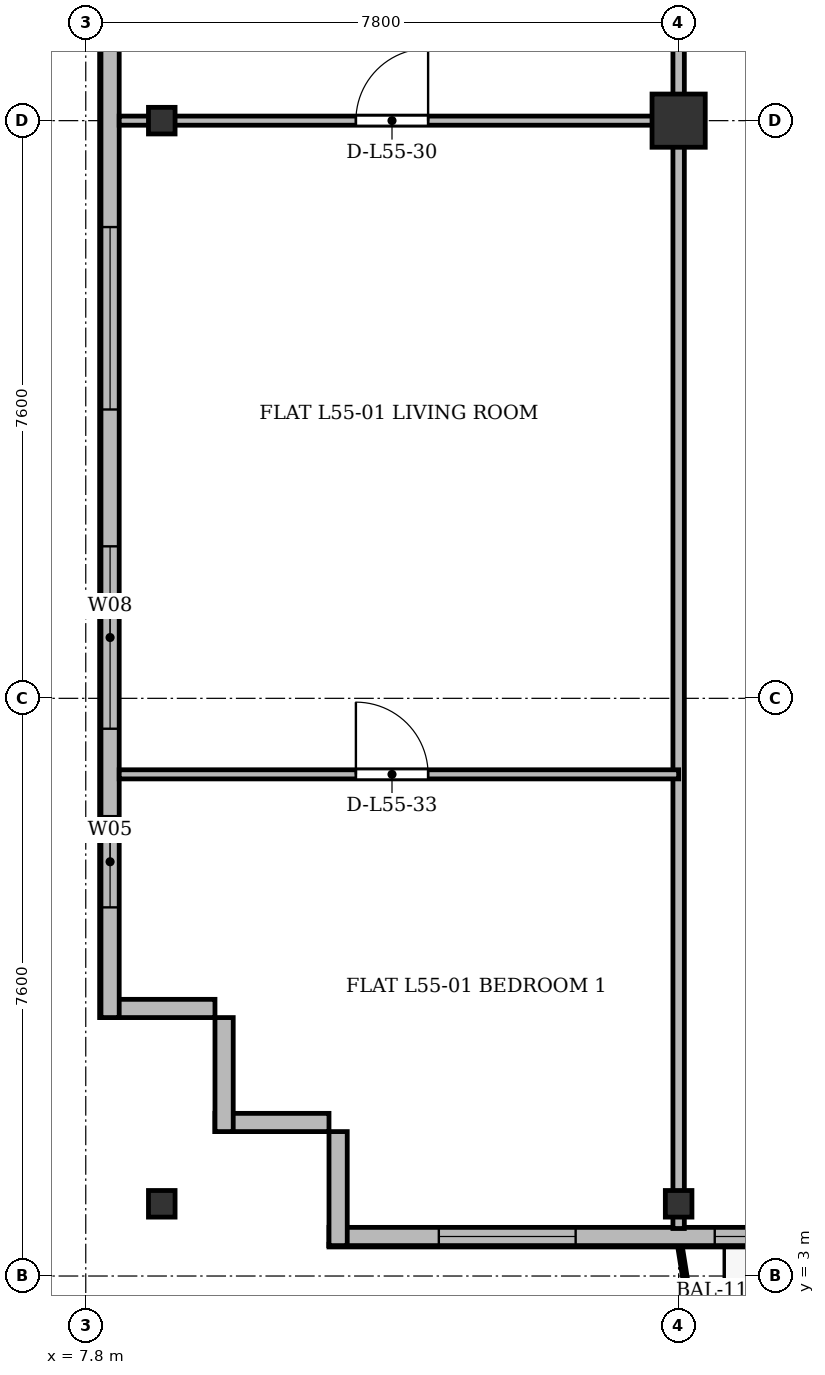
"""IFC4 building model, lengths in metres.
Left out: names, types, materials, properties, quantities, classifications, styles, units other than length and angle.
Written with IfcOpenShell. Run it as: python <this file> out.ifc"""

import sys

from ifc_helpers import new_model, si_unit, direction, frame, frame_2d, origin, origin_2d, place, context, subcontext, project, spatial, rectangle, i_section, extrude, source, transform, mapped, element, fill, save


model = new_model("IFC4")
c1 = context("Model", 3, precision=1e-05, world=origin(), true_north=direction((0.0, 1.0)))
c2 = subcontext(c1, "Body", "Model", "MODEL_VIEW")
j1 = project(units=[si_unit("LENGTHUNIT", "METRE"), si_unit("PLANEANGLEUNIT", "RADIAN")], contexts=[c1])
p1 = place(None, origin())
s1 = spatial("IfcSite", under=j1, at=p1, CompositionType="ELEMENT")
p2 = place(p1, origin())
s2 = spatial("IfcBuilding", under=s1, at=p2, CompositionType="ELEMENT")
p3 = place(p2, frame((0.0, 0.0, 212.1)))
s3 = spatial("IfcBuildingStorey", under=s2, at=p3, CompositionType="ELEMENT", Elevation=212.1)
m1 = source(origin(), c2, "Body", "SweptSolid", [
    extrude(i_section(OverallWidth=0.35, OverallDepth=0.35, WebThickness=0.018, FlangeThickness=0.028, at=origin_2d()), origin(), (0.0, 0.0, 1.0), 3.6),
])
for number, where, z_axis, x_axis in (
    (1, (8.8, 3.95, 0.0), (0.0, 0.0, 1.0), (1.0, 0.0, 0.0)),
    (2, (8.8, 18.2, 0.0), (0.0, 0.0, 1.0), (1.0, 0.0, 0.0)),
    (3, (15.6, 3.95, 0.0), (0.0, 0.0, 1.0), (1.0, 0.0, 0.0)),
):
    element("IfcColumn", number, at=place(p3, frame(where, z_axis=z_axis, x_axis=x_axis)), inside=s3, PredefinedType="COLUMN", context=c2, shape_type="MappedRepresentation", body=[
        mapped(m1, transform((0.0, 0.0, 0.0), x_axis=(1.0, 0.0, 0.0), y_axis=(0.0, 1.0, 0.0), z_axis=(0.0, 0.0, 1.0), scale=1.0)),
    ])
m2 = source(origin(), c2, "Body", "SweptSolid", [
    extrude(rectangle(XDim=0.7, YDim=0.7, at=origin_2d()), origin(), (0.0, 0.0, 1.0), 3.6),
])
p4 = place(p3, frame((15.6, 18.2, 0.0), z_axis=(0.0, 0.0, 1.0), x_axis=(1.0, 0.0, 0.0)))
e4 = element("IfcColumn", 4, at=p4, inside=s3, PredefinedType="COLUMN", context=c2, shape_type="MappedRepresentation", body=[
    mapped(m2, transform((0.0, 0.0, 0.0), x_axis=(1.0, 0.0, 0.0), y_axis=(0.0, 1.0, 0.0), z_axis=(0.0, 0.0, 1.0), scale=1.0)),
])
for number, where, z_axis, x_axis in (
    (5, (11.0, 5.02, 0.0), (0.0, 0.0, 1.0), (-1.0, 0.0, 0.0)),
    (6, (9.62, 4.9, 0.0), (0.0, 0.0, 1.0), (0.0, 1.0, 0.0)),
):
    element("IfcWall", number, at=place(p3, frame(where, z_axis=z_axis, x_axis=x_axis)), inside=s3, PredefinedType="SOLIDWALL", context=c2, shape_type="SweptSolid", body=[
        extrude(rectangle(XDim=1.5, YDim=0.24, at=frame_2d((0.75, 0.0))), origin(), (0.0, 0.0, 1.0), 3.36),
    ])
p5 = place(p3, frame((9.5, 6.52, 0.0), z_axis=(0.0, 0.0, 1.0), x_axis=(-1.0, 0.0, 0.0)))
e7 = element("IfcWall", 7, at=p5, inside=s3, PredefinedType="SOLIDWALL", context=c2, shape_type="SweptSolid", body=[
    extrude(rectangle(XDim=1.5, YDim=0.24, at=frame_2d((0.75, 0.0))), origin(), (0.0, 0.0, 1.0), 2.86),
])
p6 = place(p3, frame((8.12, 6.4, 0.0), z_axis=(0.0, 0.0, 1.0), x_axis=(0.0, 1.0, 0.0)))
e8 = element("IfcWall", 8, at=p6, inside=s3, PredefinedType="SOLIDWALL", context=c2, shape_type="SweptSolid", body=[
    extrude(rectangle(XDim=39.1, YDim=0.24, at=frame_2d((19.55, 0.0))), origin(), (0.0, 0.0, 1.0), 3.36),
])
p7 = place(p6, frame((1.45, 0.0, 0.92)))
e9 = element("IfcOpeningElement", 9, at=p7, cuts=e8, PredefinedType="OPENING", context=c2, shape_type="SweptSolid", body=[
    extrude(rectangle(XDim=1.2, YDim=1.65, at=frame_2d((0.6, 0.825))), frame((0.0, 0.13, 0.0), z_axis=(0.0, -1.0, 0.0), x_axis=(1.0, 0.0, 0.0)), (0.0, 0.0, 1.0), 0.26),
])
p8 = place(p6, frame((3.8, 0.0, 0.92)))
e10 = element("IfcOpeningElement", 10, at=p8, cuts=e8, PredefinedType="OPENING", context=c2, shape_type="SweptSolid", body=[
    extrude(rectangle(XDim=2.4, YDim=2.1, at=frame_2d((1.2, 1.05))), frame((0.0, 0.13, 0.0), z_axis=(0.0, -1.0, 0.0), x_axis=(1.0, 0.0, 0.0)), (0.0, 0.0, 1.0), 0.26),
])
p9 = place(p6, frame((8.0, 0.0, 0.92)))
e11 = element("IfcOpeningElement", 11, at=p9, cuts=e8, PredefinedType="OPENING", context=c2, shape_type="SweptSolid", body=[
    extrude(rectangle(XDim=2.4, YDim=2.1, at=frame_2d((1.2, 1.05))), frame((0.0, 0.13, 0.0), z_axis=(0.0, -1.0, 0.0), x_axis=(1.0, 0.0, 0.0)), (0.0, 0.0, 1.0), 0.26),
])
p10 = place(p6, frame((15.2, 0.0, 0.92)))
e12 = element("IfcOpeningElement", 12, at=p10, cuts=e8, PredefinedType="OPENING", context=c2, shape_type="SweptSolid", body=[
    extrude(rectangle(XDim=2.4, YDim=2.1, at=frame_2d((1.2, 1.05))), frame((0.0, 0.13, 0.0), z_axis=(0.0, -1.0, 0.0), x_axis=(1.0, 0.0, 0.0)), (0.0, 0.0, 1.0), 0.26),
])
p11 = place(p6, frame((33.4, 0.0, 0.92)))
e13 = element("IfcOpeningElement", 13, at=p11, cuts=e8, PredefinedType="OPENING", context=c2, shape_type="SweptSolid", body=[
    extrude(rectangle(XDim=1.2, YDim=1.65, at=frame_2d((0.6, 0.825))), frame((0.0, 0.13, 0.0), z_axis=(0.0, -1.0, 0.0), x_axis=(1.0, 0.0, 0.0)), (0.0, 0.0, 1.0), 0.26),
])
p12 = place(p6, frame((36.75, 0.0, 0.92)))
e14 = element("IfcOpeningElement", 14, at=p12, cuts=e8, PredefinedType="OPENING", context=c2, shape_type="SweptSolid", body=[
    extrude(rectangle(XDim=1.2, YDim=1.65, at=frame_2d((0.6, 0.825))), frame((0.0, 0.13, 0.0), z_axis=(0.0, -1.0, 0.0), x_axis=(1.0, 0.0, 0.0)), (0.0, 0.0, 1.0), 0.26),
])
p13 = place(p3, frame((63.4, 3.52, 0.0), z_axis=(0.0, 0.0, 1.0), x_axis=(-1.0, 0.0, 0.0)))
e15 = element("IfcWall", 15, at=p13, inside=s3, PredefinedType="SOLIDWALL", context=c2, shape_type="SweptSolid", body=[
    extrude(rectangle(XDim=52.4, YDim=0.24, at=frame_2d((26.2, 0.0))), origin(), (0.0, 0.0, 1.0), 3.36),
])
p14 = place(p13, frame((1.445, 0.0, 0.9)))
e16 = element("IfcOpeningElement", 16, at=p14, cuts=e15, PredefinedType="OPENING", context=c2, shape_type="SweptSolid", body=[
    extrude(rectangle(XDim=1.8, YDim=1.8, at=frame_2d((0.9, 0.9))), frame((0.0, 0.13, 0.0), z_axis=(0.0, -1.0, 0.0), x_axis=(1.0, 0.0, 0.0)), (0.0, 0.0, 1.0), 0.26),
])
p15 = place(p13, frame((5.15, 0.0, 0.9)))
e17 = element("IfcOpeningElement", 17, at=p15, cuts=e15, PredefinedType="OPENING", context=c2, shape_type="SweptSolid", body=[
    extrude(rectangle(XDim=1.5, YDim=1.75, at=frame_2d((0.75, 0.875))), frame((0.0, 0.13, 0.0), z_axis=(0.0, -1.0, 0.0), x_axis=(1.0, 0.0, 0.0)), (0.0, 0.0, 1.0), 0.26),
])
p16 = place(p13, frame((7.45, 0.0, 0.9)))
e18 = element("IfcOpeningElement", 18, at=p16, cuts=e15, PredefinedType="OPENING", context=c2, shape_type="SweptSolid", body=[
    extrude(rectangle(XDim=1.5, YDim=1.75, at=frame_2d((0.75, 0.875))), frame((0.0, 0.13, 0.0), z_axis=(0.0, -1.0, 0.0), x_axis=(1.0, 0.0, 0.0)), (0.0, 0.0, 1.0), 0.26),
])
p17 = place(p13, frame((9.8, 0.0, 0.9)))
e19 = element("IfcOpeningElement", 19, at=p17, cuts=e15, PredefinedType="OPENING", context=c2, shape_type="SweptSolid", body=[
    extrude(rectangle(XDim=2.0, YDim=1.95, at=frame_2d((1.0, 0.975))), frame((0.0, 0.13, 0.0), z_axis=(0.0, -1.0, 0.0), x_axis=(1.0, 0.0, 0.0)), (0.0, 0.0, 1.0), 0.26),
])
p18 = place(p13, frame((14.217, 0.0, 0.0)))
e20 = element("IfcOpeningElement", 20, at=p18, cuts=e15, PredefinedType="OPENING", context=c2, shape_type="SweptSolid", body=[
    extrude(rectangle(XDim=1.2, YDim=2.2, at=frame_2d((0.6, 1.1))), frame((0.0, 0.13, 0.0), z_axis=(0.0, -1.0, 0.0), x_axis=(1.0, 0.0, 0.0)), (0.0, 0.0, 1.0), 0.26),
])
p19 = place(p13, frame((20.034, 0.0, 0.9)))
e21 = element("IfcOpeningElement", 21, at=p19, cuts=e15, PredefinedType="OPENING", context=c2, shape_type="SweptSolid", body=[
    extrude(rectangle(XDim=1.8, YDim=1.8, at=frame_2d((0.9, 0.9))), frame((0.0, 0.13, 0.0), z_axis=(0.0, -1.0, 0.0), x_axis=(1.0, 0.0, 0.0)), (0.0, 0.0, 1.0), 0.26),
])
p20 = place(p13, frame((22.5, 0.0, 0.9)))
e22 = element("IfcOpeningElement", 22, at=p20, cuts=e15, PredefinedType="OPENING", context=c2, shape_type="SweptSolid", body=[
    extrude(rectangle(XDim=2.2, YDim=1.8, at=frame_2d((1.1, 0.9))), frame((0.0, 0.13, 0.0), z_axis=(0.0, -1.0, 0.0), x_axis=(1.0, 0.0, 0.0)), (0.0, 0.0, 1.0), 0.26),
])
p21 = place(p13, frame((25.517, 0.0, 0.9)))
e23 = element("IfcOpeningElement", 23, at=p21, cuts=e15, PredefinedType="OPENING", context=c2, shape_type="SweptSolid", body=[
    extrude(rectangle(XDim=1.5, YDim=1.75, at=frame_2d((0.75, 0.875))), frame((0.0, 0.13, 0.0), z_axis=(0.0, -1.0, 0.0), x_axis=(1.0, 0.0, 0.0)), (0.0, 0.0, 1.0), 0.26),
])
p22 = place(p13, frame((29.2, 0.0, 0.9)))
e24 = element("IfcOpeningElement", 24, at=p22, cuts=e15, PredefinedType="OPENING", context=c2, shape_type="SweptSolid", body=[
    extrude(rectangle(XDim=2.0, YDim=1.95, at=frame_2d((1.0, 0.975))), frame((0.0, 0.13, 0.0), z_axis=(0.0, -1.0, 0.0), x_axis=(1.0, 0.0, 0.0)), (0.0, 0.0, 1.0), 0.26),
])
p23 = place(p13, frame((33.175, 0.0, 0.9)))
e25 = element("IfcOpeningElement", 25, at=p23, cuts=e15, PredefinedType="OPENING", context=c2, shape_type="SweptSolid", body=[
    extrude(rectangle(XDim=1.65, YDim=1.85, at=frame_2d((0.825, 0.925))), frame((0.0, 0.13, 0.0), z_axis=(0.0, -1.0, 0.0), x_axis=(1.0, 0.0, 0.0)), (0.0, 0.0, 1.0), 0.26),
])
p24 = place(p13, frame((35.5, 0.0, 0.9)))
e26 = element("IfcOpeningElement", 26, at=p24, cuts=e15, PredefinedType="OPENING", context=c2, shape_type="SweptSolid", body=[
    extrude(rectangle(XDim=1.8, YDim=1.8, at=frame_2d((0.9, 0.9))), frame((0.0, 0.13, 0.0), z_axis=(0.0, -1.0, 0.0), x_axis=(1.0, 0.0, 0.0)), (0.0, 0.0, 1.0), 0.26),
])
p25 = place(p13, frame((38.05, 0.0, 0.9)))
e27 = element("IfcOpeningElement", 27, at=p25, cuts=e15, PredefinedType="OPENING", context=c2, shape_type="SweptSolid", body=[
    extrude(rectangle(XDim=1.5, YDim=1.75, at=frame_2d((0.75, 0.875))), frame((0.0, 0.13, 0.0), z_axis=(0.0, -1.0, 0.0), x_axis=(1.0, 0.0, 0.0)), (0.0, 0.0, 1.0), 0.26),
])
p26 = place(p13, frame((41.456, 0.0, 0.0)))
e28 = element("IfcOpeningElement", 28, at=p26, cuts=e15, PredefinedType="OPENING", context=c2, shape_type="SweptSolid", body=[
    extrude(rectangle(XDim=1.2, YDim=2.2, at=frame_2d((0.6, 1.1))), frame((0.0, 0.13, 0.0), z_axis=(0.0, -1.0, 0.0), x_axis=(1.0, 0.0, 0.0)), (0.0, 0.0, 1.0), 0.26),
])
p27 = place(p13, frame((43.45, 0.0, 0.9)))
e29 = element("IfcOpeningElement", 29, at=p27, cuts=e15, PredefinedType="OPENING", context=c2, shape_type="SweptSolid", body=[
    extrude(rectangle(XDim=1.5, YDim=1.75, at=frame_2d((0.75, 0.875))), frame((0.0, 0.13, 0.0), z_axis=(0.0, -1.0, 0.0), x_axis=(1.0, 0.0, 0.0)), (0.0, 0.0, 1.0), 0.26),
])
p28 = place(p13, frame((45.675, 0.0, 0.9)))
e30 = element("IfcOpeningElement", 30, at=p28, cuts=e15, PredefinedType="OPENING", context=c2, shape_type="SweptSolid", body=[
    extrude(rectangle(XDim=1.65, YDim=1.85, at=frame_2d((0.825, 0.925))), frame((0.0, 0.13, 0.0), z_axis=(0.0, -1.0, 0.0), x_axis=(1.0, 0.0, 0.0)), (0.0, 0.0, 1.0), 0.26),
])
p29 = place(p13, frame((49.155, 0.0, 0.9)))
e31 = element("IfcOpeningElement", 31, at=p29, cuts=e15, PredefinedType="OPENING", context=c2, shape_type="SweptSolid", body=[
    extrude(rectangle(XDim=1.8, YDim=1.8, at=frame_2d((0.9, 0.9))), frame((0.0, 0.13, 0.0), z_axis=(0.0, -1.0, 0.0), x_axis=(1.0, 0.0, 0.0)), (0.0, 0.0, 1.0), 0.26),
])
p30 = place(p3, frame((11.12, 3.4, 0.0), z_axis=(0.0, 0.0, 1.0), x_axis=(0.0, 1.0, 0.0)))
e32 = element("IfcWall", 32, at=p30, inside=s3, PredefinedType="SOLIDWALL", context=c2, shape_type="SweptSolid", body=[
    extrude(rectangle(XDim=1.5, YDim=0.24, at=frame_2d((0.75, 0.0))), origin(), (0.0, 0.0, 1.0), 2.91),
])
p31 = place(p3, frame((15.6, 3.625, 0.0), z_axis=(0.0, 0.0, 1.0), x_axis=(0.0, 1.0, 0.0)))
e33 = element("IfcWall", 33, at=p31, inside=s3, PredefinedType="PARTITIONING", context=c2, shape_type="SweptSolid", body=[
    extrude(rectangle(XDim=27.175, YDim=0.15, at=frame_2d((13.587, 0.0))), origin(), (0.0, 0.0, 1.0), 2.86),
])
p32 = place(p3, frame((8.24, 18.2, 0.0), z_axis=(0.0, 0.0, 1.0), x_axis=(1.0, 0.0, 0.0)))
e34 = element("IfcWall", 34, at=p32, inside=s3, PredefinedType="PARTITIONING", context=c2, shape_type="SweptSolid", body=[
    extrude(rectangle(XDim=7.36, YDim=0.12, at=frame_2d((3.68, 0.0))), origin(), (0.0, 0.0, 1.0), 2.91),
])
p33 = place(p32, frame((3.114, 0.0, 0.0)))
e35 = element("IfcOpeningElement", 35, at=p33, cuts=e34, PredefinedType="OPENING", context=c2, shape_type="SweptSolid", body=[
    extrude(rectangle(XDim=0.95, YDim=2.15, at=frame_2d((0.475, 1.075))), frame((0.0, 0.07, 0.0), z_axis=(0.0, -1.0, 0.0), x_axis=(1.0, 0.0, 0.0)), (0.0, 0.0, 1.0), 0.14),
])
p34 = place(p3, frame((8.24, 9.6, 0.0), z_axis=(0.0, 0.0, 1.0), x_axis=(1.0, 0.0, 0.0)))
e36 = element("IfcWall", 36, at=p34, inside=s3, PredefinedType="PARTITIONING", context=c2, shape_type="SweptSolid", body=[
    extrude(rectangle(XDim=7.36, YDim=0.12, at=frame_2d((3.68, 0.0))), origin(), (0.0, 0.0, 1.0), 2.86),
])
p35 = place(p34, frame((3.114, 0.0, 0.0)))
e37 = element("IfcOpeningElement", 37, at=p35, cuts=e36, PredefinedType="OPENING", context=c2, shape_type="SweptSolid", body=[
    extrude(rectangle(XDim=0.95, YDim=2.15, at=frame_2d((0.475, 1.075))), frame((0.0, 0.07, 0.0), z_axis=(0.0, -1.0, 0.0), x_axis=(1.0, 0.0, 0.0)), (0.0, 0.0, 1.0), 0.14),
])
m3 = source(origin(), c2, "Body", "SweptSolid", [
    extrude(rectangle(XDim=1.2, YDim=1.65, at=frame_2d((0.6, 0.825))), frame((0.0, 0.03, 0.0), z_axis=(0.0, -1.0, 0.0), x_axis=(1.0, 0.0, 0.0)), (0.0, 0.0, 1.0), 0.06),
])
p36 = place(p7, origin())
e38 = element("IfcWindow", 38, at=p36, inside=s3, PartitioningType="SINGLE_PANEL", PredefinedType="WINDOW", context=c2, shape_type="MappedRepresentation", body=[
    mapped(m3, transform((0.0, 0.0, 0.0), x_axis=(1.0, 0.0, 0.0), y_axis=(0.0, 1.0, 0.0), z_axis=(0.0, 0.0, 1.0), scale=1.0)),
])
fill(e9, e38)
m4 = source(origin(), c2, "Body", "SweptSolid", [
    extrude(rectangle(XDim=2.4, YDim=2.1, at=frame_2d((1.2, 1.05))), frame((0.0, 0.03, 0.0), z_axis=(0.0, -1.0, 0.0), x_axis=(1.0, 0.0, 0.0)), (0.0, 0.0, 1.0), 0.06),
])
p37 = place(p8, origin())
e39 = element("IfcWindow", 39, at=p37, inside=s3, PartitioningType="SINGLE_PANEL", PredefinedType="WINDOW", context=c2, shape_type="MappedRepresentation", body=[
    mapped(m4, transform((0.0, 0.0, 0.0), x_axis=(1.0, 0.0, 0.0), y_axis=(0.0, 1.0, 0.0), z_axis=(0.0, 0.0, 1.0), scale=1.0)),
])
fill(e10, e39)
p38 = place(p9, origin())
e40 = element("IfcWindow", 40, at=p38, inside=s3, PartitioningType="SINGLE_PANEL", PredefinedType="WINDOW", context=c2, shape_type="MappedRepresentation", body=[
    mapped(m4, transform((0.0, 0.0, 0.0), x_axis=(1.0, 0.0, 0.0), y_axis=(0.0, 1.0, 0.0), z_axis=(0.0, 0.0, 1.0), scale=1.0)),
])
fill(e11, e40)
m5 = source(origin(), c2, "Body", "SweptSolid", [
    extrude(rectangle(XDim=1.65, YDim=1.85, at=frame_2d((0.825, 0.925))), frame((0.0, 0.03, 0.0), z_axis=(0.0, -1.0, 0.0), x_axis=(1.0, 0.0, 0.0)), (0.0, 0.0, 1.0), 0.06),
])
p39 = place(p28, origin())
e41 = element("IfcWindow", 41, at=p39, inside=s3, PartitioningType="SINGLE_PANEL", PredefinedType="WINDOW", context=c2, shape_type="MappedRepresentation", body=[
    mapped(m5, transform((0.0, 0.0, 0.0), x_axis=(1.0, 0.0, 0.0), y_axis=(0.0, 1.0, 0.0), z_axis=(0.0, 0.0, 1.0), scale=1.0)),
])
fill(e30, e41)
m6 = source(origin(), c2, "Body", "SweptSolid", [
    extrude(rectangle(XDim=1.8, YDim=1.8, at=frame_2d((0.9, 0.9))), frame((0.0, 0.03, 0.0), z_axis=(0.0, -1.0, 0.0), x_axis=(1.0, 0.0, 0.0)), (0.0, 0.0, 1.0), 0.06),
])
p40 = place(p29, origin())
e42 = element("IfcWindow", 42, at=p40, inside=s3, PartitioningType="SINGLE_PANEL", PredefinedType="WINDOW", context=c2, shape_type="MappedRepresentation", body=[
    mapped(m6, transform((0.0, 0.0, 0.0), x_axis=(1.0, 0.0, 0.0), y_axis=(0.0, 1.0, 0.0), z_axis=(0.0, 0.0, 1.0), scale=1.0)),
])
fill(e31, e42)
m7 = source(origin(), c2, "Body", "SweptSolid", [
    extrude(rectangle(XDim=0.95, YDim=2.15, at=frame_2d((0.475, 1.075))), frame((0.0, 0.025, 0.0), z_axis=(0.0, -1.0, 0.0), x_axis=(1.0, 0.0, 0.0)), (0.0, 0.0, 1.0), 0.05),
])
p41 = place(p33, origin())
e43 = element("IfcDoor", 43, at=p41, inside=s3, OperationType="SINGLE_SWING_RIGHT", PredefinedType="DOOR", context=c2, shape_type="MappedRepresentation", body=[
    mapped(m7, transform((0.0, 0.0, 0.0), x_axis=(1.0, 0.0, 0.0), y_axis=(0.0, 1.0, 0.0), z_axis=(0.0, 0.0, 1.0), scale=1.0)),
])
fill(e35, e43)
p42 = place(p35, origin())
e44 = element("IfcDoor", 44, at=p42, inside=s3, OperationType="SINGLE_SWING_LEFT", PredefinedType="DOOR", context=c2, shape_type="MappedRepresentation", body=[
    mapped(m7, transform((0.0, 0.0, 0.0), x_axis=(1.0, 0.0, 0.0), y_axis=(0.0, 1.0, 0.0), z_axis=(0.0, 0.0, 1.0), scale=1.0)),
])
fill(e37, e44)
save(model, sys.argv[1])
